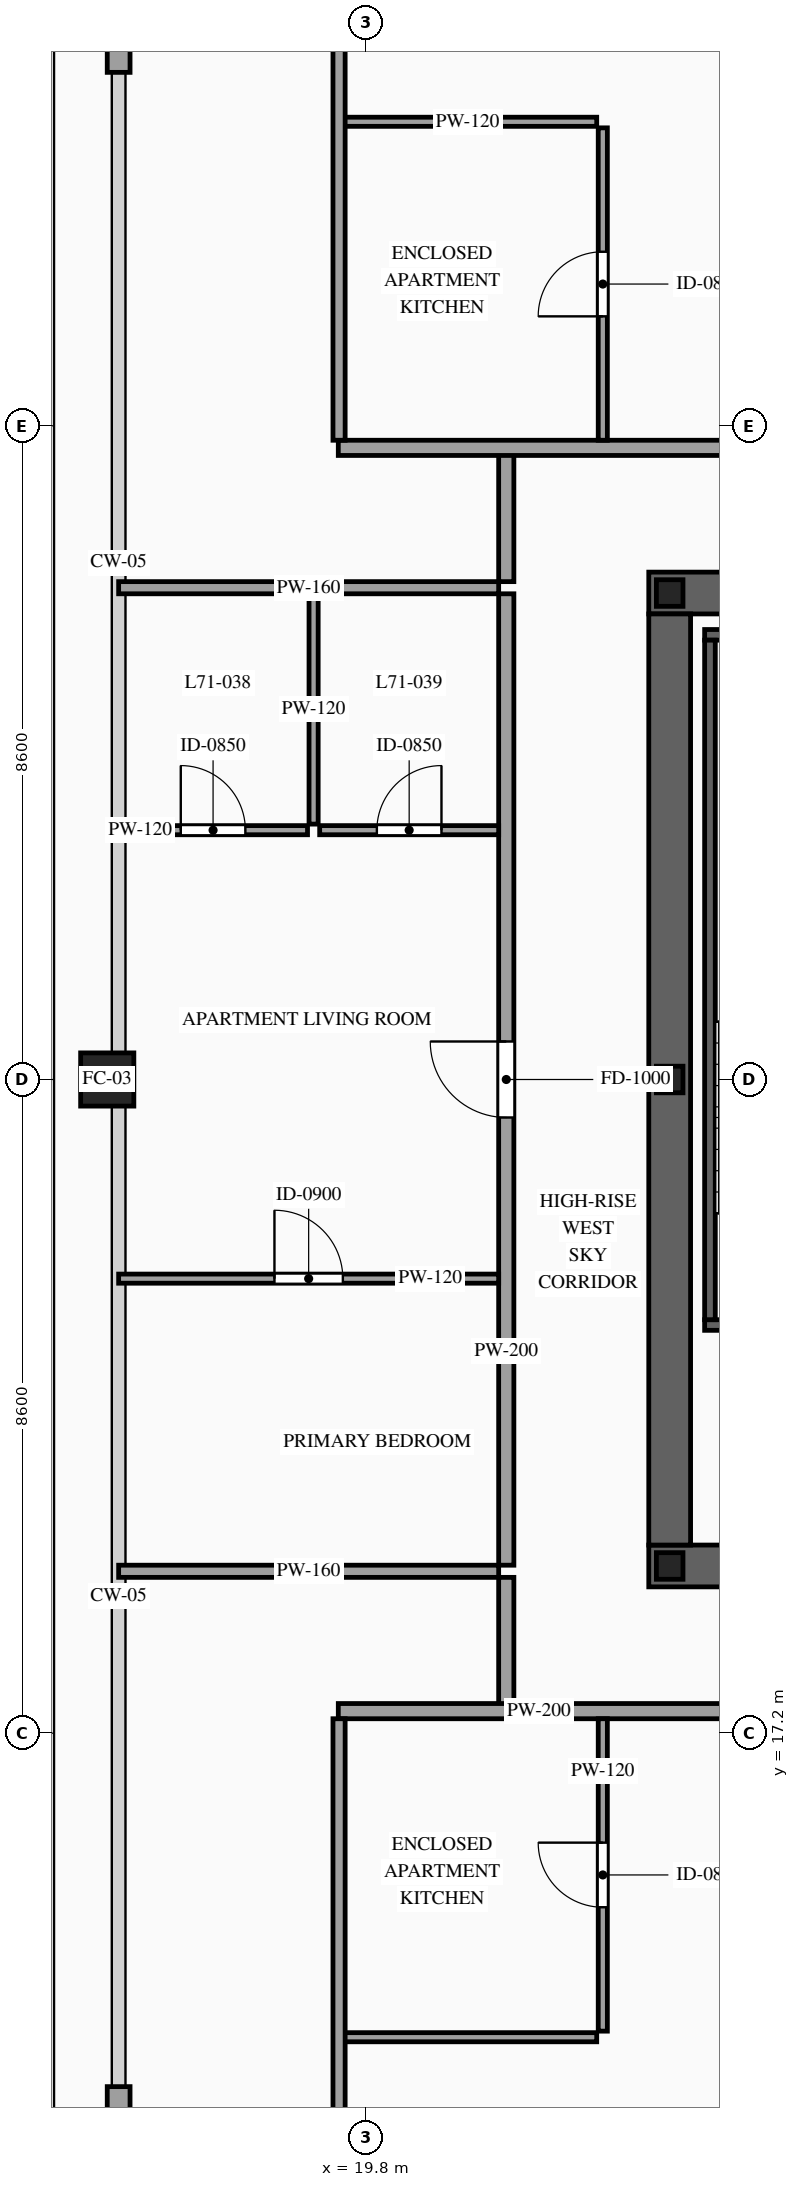
"""IFC4 building model, lengths in metres.
Left out: names, types, materials, properties, quantities, classifications, styles, units other than length and angle.
Written with IfcOpenShell. Run it as: python <this file> out.ifc"""

import sys

from ifc_helpers import new_model, si_unit, direction, frame, frame_2d, origin, origin_2d, place, context, subcontext, project, spatial, rectangle, hollow_rectangle, i_section, extrude, source, transform, mapped, element, fill, save


model = new_model("IFC4")
c1 = context("Model", 3, precision=1e-05, world=origin(), true_north=direction((0.0, 1.0)))
c2 = subcontext(c1, "Body", "Model", "MODEL_VIEW")
j1 = project(units=[si_unit("LENGTHUNIT", "METRE"), si_unit("PLANEANGLEUNIT", "RADIAN")], contexts=[c1])
p1 = place(None, origin())
s1 = spatial("IfcSite", under=j1, at=p1, CompositionType="ELEMENT")
p2 = place(p1, origin())
s2 = spatial("IfcBuilding", under=s1, at=p2, CompositionType="ELEMENT")
p3 = place(p2, frame((0.0, 0.0, 268.1)))
s3 = spatial("IfcBuildingStorey", under=s2, at=p3, CompositionType="ELEMENT", Elevation=268.1)
p4 = place(p3, frame((23.525, 19.4, 0.0), z_axis=(0.0, 0.0, 1.0), x_axis=(1.0, 0.0, 0.0)))
e1 = element("IfcWall", 1, at=p4, inside=s3, PredefinedType="SHEAR", context=c2, shape_type="SweptSolid", body=[
    extrude(rectangle(XDim=26.95, YDim=0.55, at=frame_2d((13.475, 0.0))), origin(), (0.0, 0.0, 1.0), 3.5),
])
p5 = place(p4, frame((1.925, 0.0, 0.0)))
e2 = element("IfcOpeningElement", 2, at=p5, cuts=e1, PredefinedType="OPENING", context=c2, shape_type="SweptSolid", body=[
    extrude(rectangle(XDim=1.1, YDim=2.2, at=frame_2d((0.55, 1.1))), frame((0.0, 0.29, 0.0), z_axis=(0.0, -1.0, 0.0), x_axis=(1.0, 0.0, 0.0)), (0.0, 0.0, 1.0), 0.58),
])
p6 = place(p4, frame((9.825, 0.0, 0.0)))
e3 = element("IfcOpeningElement", 3, at=p6, cuts=e1, PredefinedType="OPENING", context=c2, shape_type="SweptSolid", body=[
    extrude(rectangle(XDim=1.1, YDim=2.2, at=frame_2d((0.55, 1.1))), frame((0.0, 0.29, 0.0), z_axis=(0.0, -1.0, 0.0), x_axis=(1.0, 0.0, 0.0)), (0.0, 0.0, 1.0), 0.58),
])
p7 = place(p4, frame((23.025, 0.0, 0.0)))
e4 = element("IfcOpeningElement", 4, at=p7, cuts=e1, PredefinedType="OPENING", context=c2, shape_type="SweptSolid", body=[
    extrude(rectangle(XDim=1.1, YDim=2.2, at=frame_2d((0.55, 1.1))), frame((0.0, 0.29, 0.0), z_axis=(0.0, -1.0, 0.0), x_axis=(1.0, 0.0, 0.0)), (0.0, 0.0, 1.0), 0.58),
])
p8 = place(p4, frame((19.645, 0.0, 0.0)))
e5 = element("IfcOpeningElement", 5, at=p8, cuts=e1, PredefinedType="OPENING", context=c2, shape_type="SweptSolid", body=[
    extrude(rectangle(XDim=0.9, YDim=2.15, at=frame_2d((0.45, 1.075))), frame((0.0, 0.29, 0.0), z_axis=(0.0, -1.0, 0.0), x_axis=(1.0, 0.0, 0.0)), (0.0, 0.0, 1.0), 0.58),
])
p9 = place(p4, frame((18.205, 0.0, 0.0)))
e6 = element("IfcOpeningElement", 6, at=p9, cuts=e1, PredefinedType="OPENING", context=c2, shape_type="SweptSolid", body=[
    extrude(rectangle(XDim=0.9, YDim=2.15, at=frame_2d((0.45, 1.075))), frame((0.0, 0.29, 0.0), z_axis=(0.0, -1.0, 0.0), x_axis=(1.0, 0.0, 0.0)), (0.0, 0.0, 1.0), 0.58),
])
p10 = place(p3, frame((23.525, 32.2, 0.0), z_axis=(0.0, 0.0, 1.0), x_axis=(1.0, 0.0, 0.0)))
e7 = element("IfcWall", 7, at=p10, inside=s3, PredefinedType="SHEAR", context=c2, shape_type="SweptSolid", body=[
    extrude(rectangle(XDim=26.95, YDim=0.55, at=frame_2d((13.475, 0.0))), origin(), (0.0, 0.0, 1.0), 3.5),
])
p11 = place(p10, frame((4.545, 0.0, 0.0)))
e8 = element("IfcOpeningElement", 8, at=p11, cuts=e7, PredefinedType="OPENING", context=c2, shape_type="SweptSolid", body=[
    extrude(rectangle(XDim=0.9, YDim=2.15, at=frame_2d((0.45, 1.075))), frame((0.0, 0.29, 0.0), z_axis=(0.0, -1.0, 0.0), x_axis=(1.0, 0.0, 0.0)), (0.0, 0.0, 1.0), 0.58),
])
p12 = place(p10, frame((9.825, 0.0, 0.0)))
e9 = element("IfcOpeningElement", 9, at=p12, cuts=e7, PredefinedType="OPENING", context=c2, shape_type="SweptSolid", body=[
    extrude(rectangle(XDim=1.1, YDim=2.2, at=frame_2d((0.55, 1.1))), frame((0.0, 0.29, 0.0), z_axis=(0.0, -1.0, 0.0), x_axis=(1.0, 0.0, 0.0)), (0.0, 0.0, 1.0), 0.58),
])
p13 = place(p10, frame((15.675, 0.0, 0.0)))
e10 = element("IfcOpeningElement", 10, at=p13, cuts=e7, PredefinedType="OPENING", context=c2, shape_type="SweptSolid", body=[
    extrude(rectangle(XDim=1.1, YDim=2.2, at=frame_2d((0.55, 1.1))), frame((0.0, 0.29, 0.0), z_axis=(0.0, -1.0, 0.0), x_axis=(1.0, 0.0, 0.0)), (0.0, 0.0, 1.0), 0.58),
])
p14 = place(p10, frame((18.775, 0.0, 0.0)))
e11 = element("IfcOpeningElement", 11, at=p14, cuts=e7, PredefinedType="OPENING", context=c2, shape_type="SweptSolid", body=[
    extrude(rectangle(XDim=1.1, YDim=2.2, at=frame_2d((0.55, 1.1))), frame((0.0, 0.29, 0.0), z_axis=(0.0, -1.0, 0.0), x_axis=(1.0, 0.0, 0.0)), (0.0, 0.0, 1.0), 0.58),
])
m1 = source(origin(), c2, "Body", "SweptSolid", [
    extrude(rectangle(XDim=12.25, YDim=0.55, at=frame_2d((6.125, 0.0))), origin(), (0.0, 0.0, 1.0), 3.5),
])
p15 = place(p3, frame((23.8, 19.675, 0.0), z_axis=(0.0, 0.0, 1.0), x_axis=(0.0, 1.0, 0.0)))
e12 = element("IfcWall", 12, at=p15, inside=s3, PredefinedType="SHEAR", context=c2, shape_type="MappedRepresentation", body=[
    mapped(m1, transform((0.0, 0.0, 0.0), scale=1.0)),
])
m2 = source(origin(), c2, "Body", "SweptSolid", [
    extrude(i_section(OverallWidth=0.35, OverallDepth=0.35, WebThickness=0.012, FlangeThickness=0.019, at=origin_2d()), origin(), (0.0, 0.0, 1.0), 3.5),
])
for number, where, z_axis, x_axis in (
    (13, (23.8, 19.4, 0.0), (0.0, 0.0, 1.0), (1.0, 0.0, 0.0)),
    (14, (23.8, 25.8, 0.0), (0.0, 0.0, 1.0), (1.0, 0.0, 0.0)),
    (15, (23.8, 32.2, 0.0), (0.0, 0.0, 1.0), (1.0, 0.0, 0.0)),
):
    element("IfcColumn", number, at=place(p3, frame(where, z_axis=z_axis, x_axis=x_axis)), inside=s3, PredefinedType="COLUMN", context=c2, shape_type="MappedRepresentation", body=[
        mapped(m2, transform((0.0, 0.0, 0.0), scale=1.0)),
    ])
m3 = source(origin(), c2, "Body", "SweptSolid", [
    extrude(hollow_rectangle(XDim=0.7, YDim=0.7, WallThickness=0.032, at=origin_2d()), origin(), (0.0, 0.0, 1.0), 3.5),
])
p16 = place(p3, frame((16.4, 25.8, 0.0), z_axis=(0.0, 0.0, 1.0), x_axis=(1.0, 0.0, 0.0)))
e16 = element("IfcColumn", 16, at=p16, inside=s3, PredefinedType="COLUMN", context=c2, shape_type="MappedRepresentation", body=[
    mapped(m3, transform((0.0, 0.0, 0.0), scale=1.0)),
])
m4 = source(origin(), c2, "Body", "SweptSolid", [
    extrude(rectangle(XDim=3.15, YDim=0.3, at=frame_2d((1.575, 0.0))), origin(), (0.0, 0.0, 1.0), 2.835),
])
p17 = place(p3, frame((16.55, 9.4, 0.0), z_axis=(0.0, 0.0, 1.0), x_axis=(0.0, 1.0, 0.0)))
e17 = element("IfcWall", 17, at=p17, inside=s3, PredefinedType="SOLIDWALL", context=c2, shape_type="MappedRepresentation", body=[
    mapped(m4, transform((0.0, 0.0, 0.0), scale=1.0)),
])
m5 = source(origin(), c2, "Body", "SweptSolid", [
    extrude(rectangle(XDim=3.15, YDim=0.3, at=frame_2d((1.575, 0.0))), origin(), (0.0, 0.0, 1.0), 2.835),
])
p18 = place(p3, frame((16.55, 39.05, 0.0), z_axis=(0.0, 0.0, 1.0), x_axis=(0.0, 1.0, 0.0)))
e18 = element("IfcWall", 18, at=p18, inside=s3, PredefinedType="SOLIDWALL", context=c2, shape_type="MappedRepresentation", body=[
    mapped(m5, transform((0.0, 0.0, 0.0), scale=1.0)),
])
p19 = place(p3, frame((24.26, 22.57, 0.0), z_axis=(0.0, 0.0, 1.0), x_axis=(1.0, 0.0, 0.0)))
e19 = element("IfcWall", 19, at=p19, inside=s3, PredefinedType="SOLIDWALL", context=c2, shape_type="SweptSolid", body=[
    extrude(rectangle(XDim=3.28, YDim=0.14, at=frame_2d((1.64, 0.0))), origin(), (0.0, 0.0, 1.0), 3.28),
])
p20 = place(p19, frame((1.09, 0.0, 0.0)))
e20 = element("IfcOpeningElement", 20, at=p20, cuts=e19, PredefinedType="OPENING", context=c2, shape_type="SweptSolid", body=[
    extrude(rectangle(XDim=1.1, YDim=2.2, at=frame_2d((0.55, 1.1))), frame((0.0, 0.085, 0.0), z_axis=(0.0, -1.0, 0.0), x_axis=(1.0, 0.0, 0.0)), (0.0, 0.0, 1.0), 0.17),
])
m6 = source(origin(), c2, "Body", "SweptSolid", [
    extrude(rectangle(XDim=3.28, YDim=0.14, at=frame_2d((1.64, 0.0))), origin(), (0.0, 0.0, 1.0), 3.28),
])
p21 = place(p3, frame((24.26, 31.65, 0.0), z_axis=(0.0, 0.0, 1.0), x_axis=(1.0, 0.0, 0.0)))
e21 = element("IfcWall", 21, at=p21, inside=s3, PredefinedType="SOLIDWALL", context=c2, shape_type="MappedRepresentation", body=[
    mapped(m6, transform((0.0, 0.0, 0.0), scale=1.0)),
])
m7 = source(origin(), c2, "Body", "SweptSolid", [
    extrude(rectangle(XDim=8.94, YDim=0.14, at=frame_2d((4.47, 0.0))), origin(), (0.0, 0.0, 1.0), 3.28),
])
p22 = place(p3, frame((24.33, 22.64, 0.0), z_axis=(0.0, 0.0, 1.0), x_axis=(0.0, 1.0, 0.0)))
e22 = element("IfcWall", 22, at=p22, inside=s3, PredefinedType="SOLIDWALL", context=c2, shape_type="MappedRepresentation", body=[
    mapped(m7, transform((0.0, 0.0, 0.0), scale=1.0)),
])
m8 = source(origin(), c2, "Body", "SweptSolid", [
    extrude(rectangle(XDim=1.7, YDim=0.2, at=frame_2d((0.85, 0.0))), origin(), (0.0, 0.0, 1.0), 3.28),
])
for number, where, z_axis, x_axis in (
    (23, (21.65, 32.35, 0.0), (0.0, 0.0, 1.0), (0.0, 1.0, 0.0)),
    (24, (21.65, 17.55, 0.0), (0.0, 0.0, 1.0), (0.0, 1.0, 0.0)),
):
    element("IfcWall", number, at=place(p3, frame(where, z_axis=z_axis, x_axis=x_axis)), inside=s3, PredefinedType="PARTITIONING", context=c2, shape_type="MappedRepresentation", body=[
        mapped(m8, transform((0.0, 0.0, 0.0), scale=1.0)),
    ])
p23 = place(p3, frame((19.44, 17.49, 0.0), z_axis=(0.0, 0.0, 1.0), x_axis=(1.0, 0.0, 0.0)))
e25 = element("IfcWall", 25, at=p23, inside=s3, PredefinedType="PARTITIONING", context=c2, shape_type="SweptSolid", body=[
    extrude(rectangle(XDim=11.861, YDim=0.2, at=frame_2d((5.931, 0.0))), origin(), (0.0, 0.0, 1.0), 3.28),
])
p24 = place(p23, frame((5.531, 0.0, 0.0)))
e26 = element("IfcOpeningElement", 26, at=p24, cuts=e25, PredefinedType="OPENING", context=c2, shape_type="SweptSolid", body=[
    extrude(rectangle(XDim=1.0, YDim=2.2, at=frame_2d((0.5, 1.1))), frame((0.0, 0.115, 0.0), z_axis=(0.0, -1.0, 0.0), x_axis=(1.0, 0.0, 0.0)), (0.0, 0.0, 1.0), 0.23),
])
m9 = source(origin(), c2, "Body", "SweptSolid", [
    extrude(rectangle(XDim=3.4, YDim=0.12, at=frame_2d((1.7, 0.0))), origin(), (0.0, 0.0, 1.0), 3.28),
])
p25 = place(p3, frame((19.44, 13.2, 0.0), z_axis=(0.0, 0.0, 1.0), x_axis=(1.0, 0.0, 0.0)))
e27 = element("IfcWall", 27, at=p25, inside=s3, PredefinedType="PARTITIONING", context=c2, shape_type="MappedRepresentation", body=[
    mapped(m9, transform((0.0, 0.0, 0.0), scale=1.0)),
])
p26 = place(p3, frame((22.92, 13.28, 0.0), z_axis=(0.0, 0.0, 1.0), x_axis=(0.0, 1.0, 0.0)))
e28 = element("IfcWall", 28, at=p26, inside=s3, PredefinedType="PARTITIONING", context=c2, shape_type="SweptSolid", body=[
    extrude(rectangle(XDim=4.11, YDim=0.12, at=frame_2d((2.055, 0.0))), origin(), (0.0, 0.0, 1.0), 3.28),
])
p27 = place(p26, frame((1.63, 0.0, 0.0)))
e29 = element("IfcOpeningElement", 29, at=p27, cuts=e28, PredefinedType="OPENING", context=c2, shape_type="SweptSolid", body=[
    extrude(rectangle(XDim=0.85, YDim=2.1, at=frame_2d((0.425, 1.05))), frame((0.0, 0.075, 0.0), z_axis=(0.0, -1.0, 0.0), x_axis=(1.0, 0.0, 0.0)), (0.0, 0.0, 1.0), 0.15),
])
m10 = source(origin(), c2, "Body", "SweptSolid", [
    extrude(rectangle(XDim=11.89, YDim=0.16, at=frame_2d((5.945, 0.0))), origin(), (0.0, 0.0, 1.0), 3.28),
])
p28 = place(p3, frame((19.45, 5.5, 0.0), z_axis=(0.0, 0.0, 1.0), x_axis=(0.0, 1.0, 0.0)))
e30 = element("IfcWall", 30, at=p28, inside=s3, PredefinedType="PARTITIONING", context=c2, shape_type="MappedRepresentation", body=[
    mapped(m10, transform((0.0, 0.0, 0.0), scale=1.0)),
])
p29 = place(p3, frame((19.44, 34.11, 0.0), z_axis=(0.0, 0.0, 1.0), x_axis=(1.0, 0.0, 0.0)))
e31 = element("IfcWall", 31, at=p29, inside=s3, PredefinedType="PARTITIONING", context=c2, shape_type="SweptSolid", body=[
    extrude(rectangle(XDim=17.48, YDim=0.2, at=frame_2d((8.74, 0.0))), origin(), (0.0, 0.0, 1.0), 3.28),
])
p30 = place(p29, frame((8.34, 0.0, 0.0)))
e32 = element("IfcOpeningElement", 32, at=p30, cuts=e31, PredefinedType="OPENING", context=c2, shape_type="SweptSolid", body=[
    extrude(rectangle(XDim=1.0, YDim=2.2, at=frame_2d((0.5, 1.1))), frame((0.0, 0.115, 0.0), z_axis=(0.0, -1.0, 0.0), x_axis=(1.0, 0.0, 0.0)), (0.0, 0.0, 1.0), 0.23),
])
p31 = place(p3, frame((19.44, 38.4, 0.0), z_axis=(0.0, 0.0, 1.0), x_axis=(1.0, 0.0, 0.0)))
e33 = element("IfcWall", 33, at=p31, inside=s3, PredefinedType="PARTITIONING", context=c2, shape_type="MappedRepresentation", body=[
    mapped(m9, transform((0.0, 0.0, 0.0), scale=1.0)),
])
p32 = place(p3, frame((22.92, 34.21, 0.0), z_axis=(0.0, 0.0, 1.0), x_axis=(0.0, 1.0, 0.0)))
e34 = element("IfcWall", 34, at=p32, inside=s3, PredefinedType="PARTITIONING", context=c2, shape_type="SweptSolid", body=[
    extrude(rectangle(XDim=4.11, YDim=0.12, at=frame_2d((2.055, 0.0))), origin(), (0.0, 0.0, 1.0), 3.28),
])
p33 = place(p32, frame((1.63, 0.0, 0.0)))
e35 = element("IfcOpeningElement", 35, at=p33, cuts=e34, PredefinedType="OPENING", context=c2, shape_type="SweptSolid", body=[
    extrude(rectangle(XDim=0.85, YDim=2.1, at=frame_2d((0.425, 1.05))), frame((0.0, 0.075, 0.0), z_axis=(0.0, -1.0, 0.0), x_axis=(1.0, 0.0, 0.0)), (0.0, 0.0, 1.0), 0.15),
])
m11 = source(origin(), c2, "Body", "SweptSolid", [
    extrude(rectangle(XDim=11.89, YDim=0.16, at=frame_2d((5.945, 0.0))), origin(), (0.0, 0.0, 1.0), 3.28),
])
p34 = place(p3, frame((19.45, 34.21, 0.0), z_axis=(0.0, 0.0, 1.0), x_axis=(0.0, 1.0, 0.0)))
e36 = element("IfcWall", 36, at=p34, inside=s3, PredefinedType="PARTITIONING", context=c2, shape_type="MappedRepresentation", body=[
    mapped(m11, transform((0.0, 0.0, 0.0), scale=1.0)),
])
p35 = place(p3, frame((21.65, 19.41, 0.0), z_axis=(0.0, 0.0, 1.0), x_axis=(0.0, 1.0, 0.0)))
e37 = element("IfcWall", 37, at=p35, inside=s3, PredefinedType="PARTITIONING", context=c2, shape_type="SweptSolid", body=[
    extrude(rectangle(XDim=12.78, YDim=0.2, at=frame_2d((6.39, 0.0))), origin(), (0.0, 0.0, 1.0), 3.28),
])
p36 = place(p35, frame((5.89, 0.0, 0.0)))
e38 = element("IfcOpeningElement", 38, at=p36, cuts=e37, PredefinedType="OPENING", context=c2, shape_type="SweptSolid", body=[
    extrude(rectangle(XDim=1.0, YDim=2.2, at=frame_2d((0.5, 1.1))), frame((0.0, 0.115, 0.0), z_axis=(0.0, -1.0, 0.0), x_axis=(1.0, 0.0, 0.0)), (0.0, 0.0, 1.0), 0.23),
])
m12 = source(origin(), c2, "Body", "SweptSolid", [
    extrude(rectangle(XDim=5.0, YDim=0.16, at=frame_2d((2.5, 0.0))), origin(), (0.0, 0.0, 1.0), 2.825),
])
for number, where, z_axis, x_axis in (
    (39, (16.55, 19.33, 0.0), (0.0, 0.0, 1.0), (1.0, 0.0, 0.0)),
    (40, (16.55, 32.27, 0.0), (0.0, 0.0, 1.0), (1.0, 0.0, 0.0)),
):
    element("IfcWall", number, at=place(p3, frame(where, z_axis=z_axis, x_axis=x_axis)), inside=s3, PredefinedType="PARTITIONING", context=c2, shape_type="MappedRepresentation", body=[
        mapped(m12, transform((0.0, 0.0, 0.0), scale=1.0)),
    ])
p37 = place(p3, frame((16.55, 29.08, 0.0), z_axis=(0.0, 0.0, 1.0), x_axis=(1.0, 0.0, 0.0)))
e41 = element("IfcWall", 41, at=p37, inside=s3, PredefinedType="PARTITIONING", context=c2, shape_type="SweptSolid", body=[
    extrude(rectangle(XDim=2.485, YDim=0.12, at=frame_2d((1.242, 0.0))), origin(), (0.0, 0.0, 1.0), 3.28),
])
p38 = place(p37, frame((0.817, 0.0, 0.0)))
e42 = element("IfcOpeningElement", 42, at=p38, cuts=e41, PredefinedType="OPENING", context=c2, shape_type="SweptSolid", body=[
    extrude(rectangle(XDim=0.85, YDim=2.1, at=frame_2d((0.425, 1.05))), frame((0.0, 0.075, 0.0), z_axis=(0.0, -1.0, 0.0), x_axis=(1.0, 0.0, 0.0)), (0.0, 0.0, 1.0), 0.15),
])
m13 = source(origin(), c2, "Body", "SweptSolid", [
    extrude(rectangle(XDim=3.03, YDim=0.12, at=frame_2d((1.515, 0.0))), origin(), (0.0, 0.0, 1.0), 3.28),
])
p39 = place(p3, frame((19.115, 29.16, 0.0), z_axis=(0.0, 0.0, 1.0), x_axis=(0.0, 1.0, 0.0)))
e43 = element("IfcWall", 43, at=p39, inside=s3, PredefinedType="PARTITIONING", context=c2, shape_type="MappedRepresentation", body=[
    mapped(m13, transform((0.0, 0.0, 0.0), scale=1.0)),
])
p40 = place(p3, frame((19.195, 29.08, 0.0), z_axis=(0.0, 0.0, 1.0), x_axis=(1.0, 0.0, 0.0)))
e44 = element("IfcWall", 44, at=p40, inside=s3, PredefinedType="PARTITIONING", context=c2, shape_type="SweptSolid", body=[
    extrude(rectangle(XDim=2.355, YDim=0.12, at=frame_2d((1.177, 0.0))), origin(), (0.0, 0.0, 1.0), 3.28),
])
p41 = place(p40, frame((0.752, 0.0, 0.0)))
e45 = element("IfcOpeningElement", 45, at=p41, cuts=e44, PredefinedType="OPENING", context=c2, shape_type="SweptSolid", body=[
    extrude(rectangle(XDim=0.85, YDim=2.1, at=frame_2d((0.425, 1.05))), frame((0.0, 0.075, 0.0), z_axis=(0.0, -1.0, 0.0), x_axis=(1.0, 0.0, 0.0)), (0.0, 0.0, 1.0), 0.15),
])
p42 = place(p3, frame((16.55, 23.18, 0.0), z_axis=(0.0, 0.0, 1.0), x_axis=(1.0, 0.0, 0.0)))
e46 = element("IfcWall", 46, at=p42, inside=s3, PredefinedType="PARTITIONING", context=c2, shape_type="SweptSolid", body=[
    extrude(rectangle(XDim=5.0, YDim=0.12, at=frame_2d((2.5, 0.0))), origin(), (0.0, 0.0, 1.0), 3.28),
])
p43 = place(p42, frame((2.05, 0.0, 0.0)))
e47 = element("IfcOpeningElement", 47, at=p43, cuts=e46, PredefinedType="OPENING", context=c2, shape_type="SweptSolid", body=[
    extrude(rectangle(XDim=0.9, YDim=2.15, at=frame_2d((0.45, 1.075))), frame((0.0, 0.075, 0.0), z_axis=(0.0, -1.0, 0.0), x_axis=(1.0, 0.0, 0.0)), (0.0, 0.0, 1.0), 0.15),
])
m14 = source(origin(), c2, "Body", "SweptSolid", [
    extrude(rectangle(XDim=0.85, YDim=2.1, at=frame_2d((0.425, 1.05))), frame((0.0, 0.025, 0.0), z_axis=(0.0, -1.0, 0.0), x_axis=(1.0, 0.0, 0.0)), (0.0, 0.0, 1.0), 0.05),
])
p44 = place(p27, origin())
e48 = element("IfcDoor", 48, at=p44, inside=s3, OperationType="SINGLE_SWING_RIGHT", PredefinedType="DOOR", context=c2, shape_type="MappedRepresentation", body=[
    mapped(m14, transform((0.0, 0.0, 0.0), scale=1.0)),
])
fill(e29, e48)
p45 = place(p33, origin())
e49 = element("IfcDoor", 49, at=p45, inside=s3, OperationType="SINGLE_SWING_LEFT", PredefinedType="DOOR", context=c2, shape_type="MappedRepresentation", body=[
    mapped(m14, transform((0.0, 0.0, 0.0), scale=1.0)),
])
fill(e35, e49)
m15 = source(origin(), c2, "Body", "SweptSolid", [
    extrude(rectangle(XDim=1.0, YDim=2.2, at=frame_2d((0.5, 1.1))), frame((0.0, 0.025, 0.0), z_axis=(0.0, -1.0, 0.0), x_axis=(1.0, 0.0, 0.0)), (0.0, 0.0, 1.0), 0.05),
])
p46 = place(p36, origin())
e50 = element("IfcDoor", 50, at=p46, inside=s3, OperationType="SINGLE_SWING_RIGHT", PredefinedType="DOOR", context=c2, shape_type="MappedRepresentation", body=[
    mapped(m15, transform((0.0, 0.0, 0.0), scale=1.0)),
])
fill(e38, e50)
p47 = place(p38, origin())
e51 = element("IfcDoor", 51, at=p47, inside=s3, OperationType="SINGLE_SWING_LEFT", PredefinedType="DOOR", context=c2, shape_type="MappedRepresentation", body=[
    mapped(m14, transform((0.0, 0.0, 0.0), scale=1.0)),
])
fill(e42, e51)
p48 = place(p41, origin())
e52 = element("IfcDoor", 52, at=p48, inside=s3, OperationType="SINGLE_SWING_RIGHT", PredefinedType="DOOR", context=c2, shape_type="MappedRepresentation", body=[
    mapped(m14, transform((0.0, 0.0, 0.0), scale=1.0)),
])
fill(e45, e52)
m16 = source(origin(), c2, "Body", "SweptSolid", [
    extrude(rectangle(XDim=0.9, YDim=2.15, at=frame_2d((0.45, 1.075))), frame((0.0, 0.025, 0.0), z_axis=(0.0, -1.0, 0.0), x_axis=(1.0, 0.0, 0.0)), (0.0, 0.0, 1.0), 0.05),
])
p49 = place(p43, origin())
e53 = element("IfcDoor", 53, at=p49, inside=s3, OperationType="SINGLE_SWING_LEFT", PredefinedType="DOOR", context=c2, shape_type="MappedRepresentation", body=[
    mapped(m16, transform((0.0, 0.0, 0.0), scale=1.0)),
])
fill(e47, e53)
save(model, sys.argv[1])
